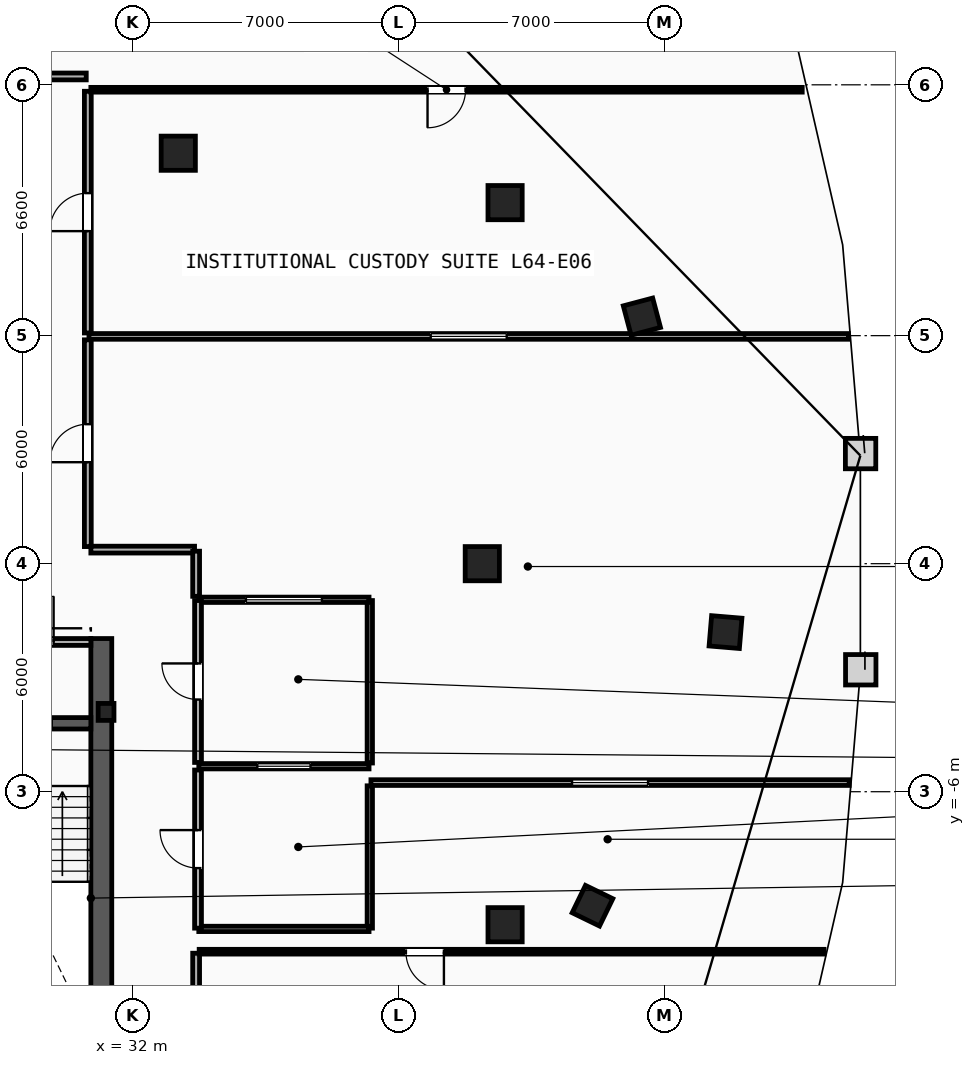
"""IFC4 building model, lengths in metres.
Left out: names, types, materials, properties, quantities, classifications, styles, units other than length and angle.
Written with IfcOpenShell. Run it as: python <this file> out.ifc"""

import sys

from ifc_helpers import new_model, si_unit, direction, frame, frame_2d, origin, origin_2d, place, context, subcontext, project, spatial, rectangle, i_section, extrude, element, fill, save


model = new_model("IFC4")
c1 = context("Model", 3, precision=1e-05, world=origin(), true_north=direction((0.0, 1.0)))
c2 = subcontext(c1, "Body", "Model", "MODEL_VIEW")
j1 = project(units=[si_unit("LENGTHUNIT", "METRE"), si_unit("PLANEANGLEUNIT", "RADIAN")], contexts=[c1])
p1 = place(None, origin())
s1 = spatial("IfcSite", under=j1, at=p1, CompositionType="ELEMENT")
p2 = place(p1, origin())
s2 = spatial("IfcBuilding", under=s1, at=p2, CompositionType="ELEMENT")
p3 = place(p2, frame((0.0, 0.0, 243.2)))
s3 = spatial("IfcBuildingStorey", under=s2, at=p3, CompositionType="ELEMENT", Elevation=243.2)
p4 = place(p3, frame((31.3, -3.9, 0.0), z_axis=(0.0, 0.0, 1.0), x_axis=(1.0, 0.0, 0.0)))
e1 = element("IfcColumn", 1, at=p4, inside=s3, PredefinedType="COLUMN", context=c2, shape_type="SweptSolid", body=[
    extrude(i_section(OverallWidth=0.416, OverallDepth=0.446, WebThickness=0.039, FlangeThickness=0.063, FilletRadius=0.018, at=origin_2d()), origin(), (0.0, 0.0, 1.0), 3.6),
])
for number, where, z_axis, x_axis in (
    (2, (41.2, 0.0, 0.0), (0.0, 0.0, 1.0), (1.0, 0.0, 0.0)),
    (3, (41.8, -9.5, 0.0), (0.0, 0.0, 1.0), (1.0, 0.0, 0.0)),
    (4, (41.8, 9.5, 0.0), (0.0, 0.0, 1.0), (1.0, 0.0, 0.0)),
    (5, (33.2, 10.8, 0.0), (0.0, 0.0, 1.0), (1.0, 0.0, 0.0)),
):
    element("IfcColumn", number, at=place(p3, frame(where, z_axis=z_axis, x_axis=x_axis)), inside=s3, PredefinedType="COLUMN", context=c2, shape_type="SweptSolid", body=[
        extrude(rectangle(XDim=0.9, YDim=0.9, at=origin_2d()), origin(), (0.0, 0.0, 1.0), 3.6),
    ])
for number, where, z_axis, x_axis in (
    (6, (44.1, -9.0, 0.0), (0.0, 0.0, 1.0), (0.437, 0.899, 0.0)),
    (7, (47.6, -1.8, 0.0), (0.0, 0.0, 1.0), (0.084, 0.997, 0.0)),
    (8, (45.4, 6.5, 0.0), (0.0, 0.0, 1.0), (-0.256, 0.967, 0.0)),
):
    element("IfcColumn", number, at=place(p3, frame(where, z_axis=z_axis, x_axis=x_axis)), inside=s3, PredefinedType="COLUMN", context=c2, shape_type="SweptSolid", body=[
        extrude(rectangle(XDim=0.8, YDim=0.8, at=origin_2d()), origin(), (0.0, 0.0, 1.0), 3.6),
    ])
p5 = place(p3, frame((31.175, -15.3, 0.0), z_axis=(0.0, 0.0, 1.0), x_axis=(0.0, 1.0, 0.0)))
e9 = element("IfcWall", 9, at=p5, inside=s3, PredefinedType="SHEAR", context=c2, shape_type="SweptSolid", body=[
    extrude(rectangle(XDim=13.33, YDim=0.55, at=frame_2d((6.665, 0.0))), origin(), (0.0, 0.0, 1.0), 3.34),
])
p6 = place(p3, frame((27.74, -4.2, 0.0), z_axis=(0.0, 0.0, 1.0), x_axis=(1.0, 0.0, 0.0)))
e10 = element("IfcWall", 10, at=p6, inside=s3, PredefinedType="SHEAR", context=c2, shape_type="SweptSolid", body=[
    extrude(rectangle(XDim=3.16, YDim=0.3, at=frame_2d((1.58, 0.0))), origin(), (0.0, 0.0, 1.0), 3.34),
])
p7 = place(p6, frame((1.03, 0.0, 0.0)))
e11 = element("IfcOpeningElement", 11, at=p7, cuts=e10, PredefinedType="OPENING", context=c2, shape_type="SweptSolid", body=[
    extrude(rectangle(XDim=1.1, YDim=2.15, at=frame_2d((0.55, 1.075))), frame((0.0, 0.16, 0.0), z_axis=(0.0, -1.0, 0.0), x_axis=(1.0, 0.0, 0.0)), (0.0, 0.0, 1.0), 0.32),
])
p8 = place(p3, frame((27.74, -2.06, 0.0), z_axis=(0.0, 0.0, 1.0), x_axis=(1.0, 0.0, 0.0)))
e12 = element("IfcWall", 12, at=p8, inside=s3, PredefinedType="PARTITIONING", context=c2, shape_type="SweptSolid", body=[
    extrude(rectangle(XDim=3.16, YDim=0.18, at=frame_2d((1.58, 0.0))), origin(), (0.0, 0.0, 1.0), 3.34),
])
p9 = place(p8, frame((0.98, 0.0, 0.0)))
e13 = element("IfcOpeningElement", 13, at=p9, cuts=e12, PredefinedType="OPENING", context=c2, shape_type="SweptSolid", body=[
    extrude(rectangle(XDim=1.2, YDim=2.15, at=frame_2d((0.6, 1.075))), frame((0.0, 0.1, 0.0), z_axis=(0.0, -1.0, 0.0), x_axis=(1.0, 0.0, 0.0)), (0.0, 0.0, 1.0), 0.2),
])
p10 = place(p3, frame((38.24, -9.59, 0.0), z_axis=(0.0, 0.0, 1.0), x_axis=(0.0, 1.0, 0.0)))
e14 = element("IfcWall", 14, at=p10, inside=s3, PredefinedType="PARTITIONING", context=c2, shape_type="SweptSolid", body=[
    extrude(rectangle(XDim=3.745, YDim=0.14, at=frame_2d((1.873, 0.0))), origin(), (0.0, 0.0, 1.0), 3.34),
])
p11 = place(p3, frame((38.24, -5.245, 0.0), z_axis=(0.0, 0.0, 1.0), x_axis=(0.0, 1.0, 0.0)))
e15 = element("IfcWall", 15, at=p11, inside=s3, PredefinedType="PARTITIONING", context=c2, shape_type="SweptSolid", body=[
    extrude(rectangle(XDim=4.275, YDim=0.14, at=frame_2d((2.138, 0.0))), origin(), (0.0, 0.0, 1.0), 3.34),
])
p12 = place(p3, frame((33.74, -0.95, 0.0), z_axis=(0.0, 0.0, 1.0), x_axis=(1.0, 0.0, 0.0)))
e16 = element("IfcWall", 16, at=p12, inside=s3, PredefinedType="PARTITIONING", context=c2, shape_type="SweptSolid", body=[
    extrude(rectangle(XDim=4.48, YDim=0.14, at=frame_2d((2.24, 0.0))), origin(), (0.0, 0.0, 1.0), 3.34),
])
p13 = place(p12, frame((1.24, 0.0, 1.05)))
e17 = element("IfcOpeningElement", 17, at=p13, cuts=e16, PredefinedType="OPENING", context=c2, shape_type="SweptSolid", body=[
    extrude(rectangle(XDim=2.0, YDim=1.5, at=frame_2d((1.0, 0.75))), frame((0.0, 0.08, 0.0), z_axis=(0.0, -1.0, 0.0), x_axis=(1.0, 0.0, 0.0)), (0.0, 0.0, 1.0), 0.16),
])
p14 = place(p3, frame((33.74, -5.33, 0.0), z_axis=(0.0, 0.0, 1.0), x_axis=(1.0, 0.0, 0.0)))
e18 = element("IfcWall", 18, at=p14, inside=s3, PredefinedType="PARTITIONING", context=c2, shape_type="SweptSolid", body=[
    extrude(rectangle(XDim=4.48, YDim=0.14, at=frame_2d((2.24, 0.0))), origin(), (0.0, 0.0, 1.0), 3.34),
])
p15 = place(p14, frame((1.54, 0.0, 1.05)))
e19 = element("IfcOpeningElement", 19, at=p15, cuts=e18, PredefinedType="OPENING", context=c2, shape_type="SweptSolid", body=[
    extrude(rectangle(XDim=1.4, YDim=1.5, at=frame_2d((0.7, 0.75))), frame((0.0, 0.08, 0.0), z_axis=(0.0, -1.0, 0.0), x_axis=(1.0, 0.0, 0.0)), (0.0, 0.0, 1.0), 0.16),
])
p16 = place(p3, frame((33.74, -9.61, 0.0), z_axis=(0.0, 0.0, 1.0), x_axis=(1.0, 0.0, 0.0)))
e20 = element("IfcWall", 20, at=p16, inside=s3, PredefinedType="PARTITIONING", context=c2, shape_type="SweptSolid", body=[
    extrude(rectangle(XDim=4.48, YDim=0.14, at=frame_2d((2.24, 0.0))), origin(), (0.0, 0.0, 1.0), 3.34),
])
p17 = place(p3, frame((33.72, -5.23, 0.0), z_axis=(0.0, 0.0, 1.0), x_axis=(0.0, 1.0, 0.0)))
e21 = element("IfcWall", 21, at=p17, inside=s3, PredefinedType="PARTITIONING", context=c2, shape_type="SweptSolid", body=[
    extrude(rectangle(XDim=4.26, YDim=0.18, at=frame_2d((2.13, 0.0))), origin(), (0.0, 0.0, 1.0), 3.34),
])
p18 = place(p17, frame((1.655, 0.0, 0.0)))
e22 = element("IfcOpeningElement", 22, at=p18, cuts=e21, PredefinedType="OPENING", context=c2, shape_type="SweptSolid", body=[
    extrude(rectangle(XDim=0.95, YDim=2.1, at=frame_2d((0.475, 1.05))), frame((0.0, 0.1, 0.0), z_axis=(0.0, -1.0, 0.0), x_axis=(1.0, 0.0, 0.0)), (0.0, 0.0, 1.0), 0.2),
])
p19 = place(p3, frame((33.72, -9.59, 0.0), z_axis=(0.0, 0.0, 1.0), x_axis=(0.0, 1.0, 0.0)))
e23 = element("IfcWall", 23, at=p19, inside=s3, PredefinedType="PARTITIONING", context=c2, shape_type="SweptSolid", body=[
    extrude(rectangle(XDim=4.16, YDim=0.18, at=frame_2d((2.08, 0.0))), origin(), (0.0, 0.0, 1.0), 3.34),
])
p20 = place(p19, frame((1.58, 0.0, 0.0)))
e24 = element("IfcOpeningElement", 24, at=p20, cuts=e23, PredefinedType="OPENING", context=c2, shape_type="SweptSolid", body=[
    extrude(rectangle(XDim=1.0, YDim=2.15, at=frame_2d((0.5, 1.075))), frame((0.0, 0.1, 0.0), z_axis=(0.0, -1.0, 0.0), x_axis=(1.0, 0.0, 0.0)), (0.0, 0.0, 1.0), 0.2),
])
p21 = place(p3, frame((30.85, 5.98, 0.0), z_axis=(0.0, 0.0, 1.0), x_axis=(1.0, 0.0, 0.0)))
e25 = element("IfcWall", 25, at=p21, inside=s3, PredefinedType="PARTITIONING", context=c2, shape_type="SweptSolid", body=[
    extrude(rectangle(XDim=19.985, YDim=0.15, at=frame_2d((9.993, 0.0))), origin(), (0.0, 0.0, 1.0), 3.34),
])
p22 = place(p21, frame((8.993, 0.0, 1.05)))
e26 = element("IfcOpeningElement", 26, at=p22, cuts=e25, PredefinedType="OPENING", context=c2, shape_type="SweptSolid", body=[
    extrude(rectangle(XDim=2.0, YDim=1.5, at=frame_2d((1.0, 0.75))), frame((0.0, 0.085, 0.0), z_axis=(0.0, -1.0, 0.0), x_axis=(1.0, 0.0, 0.0)), (0.0, 0.0, 1.0), 0.17),
])
p23 = place(p3, frame((38.27, -5.76, 0.0), z_axis=(0.0, 0.0, 1.0), x_axis=(1.0, 0.0, 0.0)))
e27 = element("IfcWall", 27, at=p23, inside=s3, PredefinedType="PARTITIONING", context=c2, shape_type="SweptSolid", body=[
    extrude(rectangle(XDim=12.584, YDim=0.15, at=frame_2d((6.292, 0.0))), origin(), (0.0, 0.0, 1.0), 3.34),
])
p24 = place(p23, frame((5.292, 0.0, 1.05)))
e28 = element("IfcOpeningElement", 28, at=p24, cuts=e27, PredefinedType="OPENING", context=c2, shape_type="SweptSolid", body=[
    extrude(rectangle(XDim=2.0, YDim=1.5, at=frame_2d((1.0, 0.75))), frame((0.0, 0.085, 0.0), z_axis=(0.0, -1.0, 0.0), x_axis=(1.0, 0.0, 0.0)), (0.0, 0.0, 1.0), 0.17),
])
p25 = place(p3, frame((33.67, -17.428, 0.0), z_axis=(0.0, 0.0, 1.0), x_axis=(0.0, 1.0, 0.0)))
e29 = element("IfcWall", 29, at=p25, inside=s3, PredefinedType="PARTITIONING", context=c2, shape_type="SweptSolid", body=[
    extrude(rectangle(XDim=7.178, YDim=0.18, at=frame_2d((3.589, 0.0))), origin(), (0.0, 0.0, 1.0), 3.34),
])
p26 = place(p3, frame((30.82, 0.45, 0.0), z_axis=(0.0, 0.0, 1.0), x_axis=(0.0, 1.0, 0.0)))
e30 = element("IfcWall", 30, at=p26, inside=s3, PredefinedType="PARTITIONING", context=c2, shape_type="SweptSolid", body=[
    extrude(rectangle(XDim=5.44, YDim=0.18, at=frame_2d((2.72, 0.0))), origin(), (0.0, 0.0, 1.0), 3.34),
])
p27 = place(p26, frame((2.22, 0.0, 0.0)))
e31 = element("IfcOpeningElement", 31, at=p27, cuts=e30, PredefinedType="OPENING", context=c2, shape_type="SweptSolid", body=[
    extrude(rectangle(XDim=1.0, YDim=2.15, at=frame_2d((0.5, 1.075))), frame((0.0, 0.1, 0.0), z_axis=(0.0, -1.0, 0.0), x_axis=(1.0, 0.0, 0.0)), (0.0, 0.0, 1.0), 0.2),
])
p28 = place(p3, frame((33.628, 0.37, 0.0), z_axis=(0.0, 0.0, 1.0), x_axis=(-1.0, 0.0, 0.0)))
e32 = element("IfcWall", 32, at=p28, inside=s3, PredefinedType="PARTITIONING", context=c2, shape_type="SweptSolid", body=[
    extrude(rectangle(XDim=2.729, YDim=0.18, at=frame_2d((1.364, 0.0))), origin(), (0.0, 0.0, 1.0), 3.34),
])
p29 = place(p3, frame((33.67, -0.859, 0.0), z_axis=(0.0, 0.0, 1.0), x_axis=(0.0, 1.0, 0.0)))
e33 = element("IfcWall", 33, at=p29, inside=s3, PredefinedType="PARTITIONING", context=c2, shape_type="SweptSolid", body=[
    extrude(rectangle(XDim=1.187, YDim=0.18, at=frame_2d((0.594, 0.0))), origin(), (0.0, 0.0, 1.0), 3.34),
])
p30 = place(p3, frame((30.82, 6.07, 0.0), z_axis=(0.0, 0.0, 1.0), x_axis=(0.0, 1.0, 0.0)))
e34 = element("IfcWall", 34, at=p30, inside=s3, PredefinedType="PARTITIONING", context=c2, shape_type="SweptSolid", body=[
    extrude(rectangle(XDim=6.36, YDim=0.18, at=frame_2d((3.18, 0.0))), origin(), (0.0, 0.0, 1.0), 3.34),
])
p31 = place(p30, frame((2.68, 0.0, 0.0)))
e35 = element("IfcOpeningElement", 35, at=p31, cuts=e34, PredefinedType="OPENING", context=c2, shape_type="SweptSolid", body=[
    extrude(rectangle(XDim=1.0, YDim=2.15, at=frame_2d((0.5, 1.075))), frame((0.0, 0.1, 0.0), z_axis=(0.0, -1.0, 0.0), x_axis=(1.0, 0.0, 0.0)), (0.0, 0.0, 1.0), 0.2),
])
p32 = place(p3, frame((30.779, 12.82, 0.0), z_axis=(0.0, 0.0, 1.0), x_axis=(-1.0, 0.0, 0.0)))
e36 = element("IfcWall", 36, at=p32, inside=s3, PredefinedType="PARTITIONING", context=c2, shape_type="SweptSolid", body=[
    extrude(rectangle(XDim=2.357, YDim=0.18, at=frame_2d((1.179, 0.0))), origin(), (0.0, 0.0, 1.0), 3.34),
])
p33 = place(p3, frame((50.191, -10.21, 0.0), z_axis=(0.0, 0.0, 1.0), x_axis=(-1.0, 0.0, 0.0)))
e37 = element("IfcWall", 37, at=p33, inside=s3, PredefinedType="PARTITIONING", context=c2, shape_type="SweptSolid", body=[
    extrude(rectangle(XDim=16.441, YDim=0.125, at=frame_2d((8.221, 0.0))), origin(), (0.0, 0.0, 1.0), 3.34),
])
p34 = place(p33, frame((10.001, 0.0, 0.0)))
e38 = element("IfcOpeningElement", 38, at=p34, cuts=e37, PredefinedType="OPENING", context=c2, shape_type="SweptSolid", body=[
    extrude(rectangle(XDim=1.0, YDim=2.15, at=frame_2d((0.5, 1.075))), frame((0.0, 0.073, 0.0), z_axis=(0.0, -1.0, 0.0), x_axis=(1.0, 0.0, 0.0)), (0.0, 0.0, 1.0), 0.145),
])
p35 = place(p3, frame((49.619, 12.47, 0.0), z_axis=(0.0, 0.0, 1.0), x_axis=(-1.0, 0.0, 0.0)))
e39 = element("IfcWall", 39, at=p35, inside=s3, PredefinedType="PARTITIONING", context=c2, shape_type="SweptSolid", body=[
    extrude(rectangle(XDim=18.719, YDim=0.125, at=frame_2d((9.359, 0.0))), origin(), (0.0, 0.0, 1.0), 3.34),
])
p36 = place(p35, frame((8.859, 0.0, 0.0)))
e40 = element("IfcOpeningElement", 40, at=p36, cuts=e39, PredefinedType="OPENING", context=c2, shape_type="SweptSolid", body=[
    extrude(rectangle(XDim=1.0, YDim=2.15, at=frame_2d((0.5, 1.075))), frame((0.0, 0.073, 0.0), z_axis=(0.0, -1.0, 0.0), x_axis=(1.0, 0.0, 0.0)), (0.0, 0.0, 1.0), 0.145),
])
p37 = place(p9, origin())
e41 = element("IfcDoor", 41, at=p37, inside=s3, OperationType="SINGLE_SWING_RIGHT", PredefinedType="DOOR", context=c2, shape_type="SweptSolid", body=[
    extrude(rectangle(XDim=1.2, YDim=2.15, at=frame_2d((0.6, 1.075))), frame((0.0, 0.025, 0.0), z_axis=(0.0, -1.0, 0.0), x_axis=(1.0, 0.0, 0.0)), (0.0, 0.0, 1.0), 0.05),
])
fill(e13, e41)
p38 = place(p36, origin())
e42 = element("IfcDoor", 42, at=p38, inside=s3, OperationType="SINGLE_SWING_RIGHT", PredefinedType="DOOR", context=c2, shape_type="SweptSolid", body=[
    extrude(rectangle(XDim=1.0, YDim=2.15, at=frame_2d((0.5, 1.075))), frame((0.0, 0.025, 0.0), z_axis=(0.0, -1.0, 0.0), x_axis=(1.0, 0.0, 0.0)), (0.0, 0.0, 1.0), 0.05),
])
fill(e40, e42)
p39 = place(p34, origin())
e43 = element("IfcDoor", 43, at=p39, inside=s3, OperationType="SINGLE_SWING_LEFT", PredefinedType="DOOR", context=c2, shape_type="SweptSolid", body=[
    extrude(rectangle(XDim=1.0, YDim=2.15, at=frame_2d((0.5, 1.075))), frame((0.0, 0.025, 0.0), z_axis=(0.0, -1.0, 0.0), x_axis=(1.0, 0.0, 0.0)), (0.0, 0.0, 1.0), 0.05),
])
fill(e38, e43)
p40 = place(p31, origin())
e44 = element("IfcDoor", 44, at=p40, inside=s3, OperationType="SINGLE_SWING_LEFT", PredefinedType="DOOR", context=c2, shape_type="SweptSolid", body=[
    extrude(rectangle(XDim=1.0, YDim=2.15, at=frame_2d((0.5, 1.075))), frame((0.0, 0.025, 0.0), z_axis=(0.0, -1.0, 0.0), x_axis=(1.0, 0.0, 0.0)), (0.0, 0.0, 1.0), 0.05),
])
fill(e35, e44)
p41 = place(p27, origin())
e45 = element("IfcDoor", 45, at=p41, inside=s3, OperationType="SINGLE_SWING_LEFT", PredefinedType="DOOR", context=c2, shape_type="SweptSolid", body=[
    extrude(rectangle(XDim=1.0, YDim=2.15, at=frame_2d((0.5, 1.075))), frame((0.0, 0.025, 0.0), z_axis=(0.0, -1.0, 0.0), x_axis=(1.0, 0.0, 0.0)), (0.0, 0.0, 1.0), 0.05),
])
fill(e31, e45)
p42 = place(p18, origin())
e46 = element("IfcDoor", 46, at=p42, inside=s3, OperationType="SINGLE_SWING_RIGHT", PredefinedType="DOOR", context=c2, shape_type="SweptSolid", body=[
    extrude(rectangle(XDim=0.95, YDim=2.1, at=frame_2d((0.475, 1.05))), frame((0.0, 0.025, 0.0), z_axis=(0.0, -1.0, 0.0), x_axis=(1.0, 0.0, 0.0)), (0.0, 0.0, 1.0), 0.05),
])
fill(e22, e46)
p43 = place(p20, origin())
e47 = element("IfcDoor", 47, at=p43, inside=s3, OperationType="SINGLE_SWING_RIGHT", PredefinedType="DOOR", context=c2, shape_type="SweptSolid", body=[
    extrude(rectangle(XDim=1.0, YDim=2.15, at=frame_2d((0.5, 1.075))), frame((0.0, 0.025, 0.0), z_axis=(0.0, -1.0, 0.0), x_axis=(1.0, 0.0, 0.0)), (0.0, 0.0, 1.0), 0.05),
])
fill(e24, e47)
p44 = place(p13, origin())
e48 = element("IfcWindow", 48, at=p44, inside=s3, PartitioningType="SINGLE_PANEL", PredefinedType="WINDOW", context=c2, shape_type="SweptSolid", body=[
    extrude(rectangle(XDim=2.0, YDim=1.5, at=frame_2d((1.0, 0.75))), frame((0.0, 0.03, 0.0), z_axis=(0.0, -1.0, 0.0), x_axis=(1.0, 0.0, 0.0)), (0.0, 0.0, 1.0), 0.06),
])
fill(e17, e48)
p45 = place(p15, origin())
e49 = element("IfcWindow", 49, at=p45, inside=s3, PartitioningType="SINGLE_PANEL", PredefinedType="WINDOW", context=c2, shape_type="SweptSolid", body=[
    extrude(rectangle(XDim=1.4, YDim=1.5, at=frame_2d((0.7, 0.75))), frame((0.0, 0.03, 0.0), z_axis=(0.0, -1.0, 0.0), x_axis=(1.0, 0.0, 0.0)), (0.0, 0.0, 1.0), 0.06),
])
fill(e19, e49)
p46 = place(p22, origin())
e50 = element("IfcWindow", 50, at=p46, inside=s3, PartitioningType="SINGLE_PANEL", PredefinedType="WINDOW", context=c2, shape_type="SweptSolid", body=[
    extrude(rectangle(XDim=2.0, YDim=1.5, at=frame_2d((1.0, 0.75))), frame((0.0, 0.03, 0.0), z_axis=(0.0, -1.0, 0.0), x_axis=(1.0, 0.0, 0.0)), (0.0, 0.0, 1.0), 0.06),
])
fill(e26, e50)
p47 = place(p24, origin())
e51 = element("IfcWindow", 51, at=p47, inside=s3, PartitioningType="SINGLE_PANEL", PredefinedType="WINDOW", context=c2, shape_type="SweptSolid", body=[
    extrude(rectangle(XDim=2.0, YDim=1.5, at=frame_2d((1.0, 0.75))), frame((0.0, 0.03, 0.0), z_axis=(0.0, -1.0, 0.0), x_axis=(1.0, 0.0, 0.0)), (0.0, 0.0, 1.0), 0.06),
])
fill(e28, e51)
save(model, sys.argv[1])
